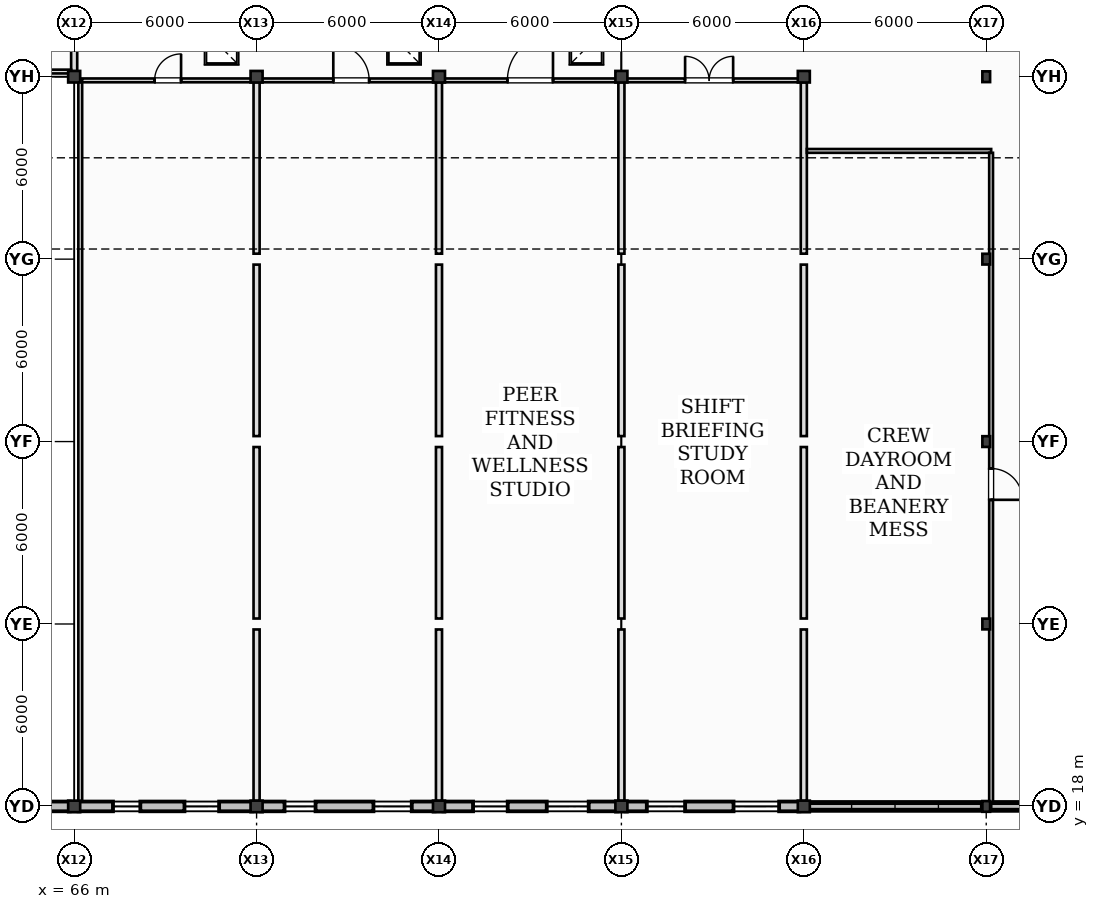
"""IFC4 building model, lengths in metres.
Left out: names, types, materials, properties, quantities, classifications, styles, units other than length and angle.
Written with IfcOpenShell. Run it as: python <this file> out.ifc"""

import sys

from ifc_helpers import new_model, si_unit, direction, frame, frame_2d, origin, origin_2d, place, context, subcontext, project, spatial, rectangle, i_section, extrude, element, fill, save


model = new_model("IFC4")
c1 = context("Model", 3, precision=1e-05, world=origin(), true_north=direction((0.0, 1.0)))
c2 = subcontext(c1, "Body", "Model", "MODEL_VIEW")
j1 = project(units=[si_unit("LENGTHUNIT", "METRE"), si_unit("PLANEANGLEUNIT", "RADIAN")], contexts=[c1])
p1 = place(None, origin())
s1 = spatial("IfcSite", under=j1, at=p1, CompositionType="ELEMENT")
p2 = place(p1, origin())
s2 = spatial("IfcBuilding", under=s1, at=p2, CompositionType="ELEMENT")
p3 = place(p2, frame((0.0, 0.0, 6.0)))
s3 = spatial("IfcBuildingStorey", under=s2, at=p3, CompositionType="ELEMENT", Elevation=6.0)
for number, where, z_axis, x_axis in (
    (1, (66.0, 42.0, 0.0), (0.0, 0.0, 1.0), (1.0, 0.0, 0.0)),
    (2, (66.0, 18.0, 0.0), (0.0, 0.0, 1.0), (1.0, 0.0, 0.0)),
    (3, (72.0, 18.0, 0.0), (0.0, 0.0, 1.0), (1.0, 0.0, 0.0)),
    (4, (72.0, 42.0, 0.0), (0.0, 0.0, 1.0), (1.0, 0.0, 0.0)),
    (5, (78.0, 18.0, 0.0), (0.0, 0.0, 1.0), (1.0, 0.0, 0.0)),
    (6, (78.0, 42.0, 0.0), (0.0, 0.0, 1.0), (1.0, 0.0, 0.0)),
    (7, (84.0, 18.0, 0.0), (0.0, 0.0, 1.0), (1.0, 0.0, 0.0)),
    (8, (84.0, 42.0, 0.0), (0.0, 0.0, 1.0), (1.0, 0.0, 0.0)),
    (9, (90.0, 18.0, 0.0), (0.0, 0.0, 1.0), (1.0, 0.0, 0.0)),
    (10, (90.0, 42.0, 0.0), (0.0, 0.0, 1.0), (1.0, 0.0, 0.0)),
):
    element("IfcColumn", number, at=place(p3, frame(where, z_axis=z_axis, x_axis=x_axis)), inside=s3, PredefinedType="COLUMN", context=c2, shape_type="SweptSolid", body=[
        extrude(i_section(OverallWidth=0.395, OverallDepth=0.38, WebThickness=0.019, FlangeThickness=0.03, at=origin_2d()), origin(), (0.0, 0.0, 1.0), 4.0),
    ])
for number, where, z_axis, x_axis in (
    (11, (96.0, 18.0, 0.0), (0.0, 0.0, 1.0), (1.0, 0.0, 0.0)),
    (12, (96.0, 24.0, 0.0), (0.0, 0.0, 1.0), (1.0, 0.0, 0.0)),
    (13, (96.0, 30.0, 0.0), (0.0, 0.0, 1.0), (1.0, 0.0, 0.0)),
    (14, (96.0, 36.0, 0.0), (0.0, 0.0, 1.0), (1.0, 0.0, 0.0)),
    (15, (96.0, 42.0, 0.0), (0.0, 0.0, 1.0), (1.0, 0.0, 0.0)),
):
    element("IfcColumn", number, at=place(p3, frame(where, z_axis=z_axis, x_axis=x_axis)), inside=s3, PredefinedType="COLUMN", context=c2, shape_type="SweptSolid", body=[
        extrude(i_section(OverallWidth=0.254, OverallDepth=0.353, WebThickness=0.01, FlangeThickness=0.016, at=origin_2d()), origin(), (0.0, 0.0, 1.0), 4.0),
    ])
p4 = place(p3, frame((60.145, 18.0, 0.0), z_axis=(0.0, 0.0, 1.0), x_axis=(1.0, 0.0, 0.0)))
e16 = element("IfcWall", 16, at=p4, inside=s3, PredefinedType="STANDARD", context=c2, shape_type="SweptSolid", body=[
    extrude(rectangle(XDim=5.71, YDim=0.32, at=frame_2d((2.855, 0.0))), origin(), (0.0, 0.0, 1.0), 4.0),
])
p5 = place(p4, frame((0.817, 0.0, 1.42)))
e17 = element("IfcOpeningElement", 17, at=p5, cuts=e16, PredefinedType="OPENING", context=c2, shape_type="SweptSolid", body=[
    extrude(rectangle(XDim=0.9, YDim=0.9, at=frame_2d((0.45, 0.45))), frame((0.0, 0.17, 0.0), z_axis=(0.0, -1.0, 0.0), x_axis=(1.0, 0.0, 0.0)), (0.0, 0.0, 1.0), 0.34),
])
p6 = place(p4, frame((3.777, 0.0, 1.28)))
e18 = element("IfcOpeningElement", 18, at=p6, cuts=e16, PredefinedType="OPENING", context=c2, shape_type="SweptSolid", body=[
    extrude(rectangle(XDim=1.14, YDim=1.14, at=frame_2d((0.57, 0.57))), frame((0.0, 0.17, 0.0), z_axis=(0.0, -1.0, 0.0), x_axis=(1.0, 0.0, 0.0)), (0.0, 0.0, 1.0), 0.34),
])
p7 = place(p3, frame((66.145, 18.0, 0.0), z_axis=(0.0, 0.0, 1.0), x_axis=(1.0, 0.0, 0.0)))
e19 = element("IfcWall", 19, at=p7, inside=s3, PredefinedType="STANDARD", context=c2, shape_type="SweptSolid", body=[
    extrude(rectangle(XDim=5.71, YDim=0.32, at=frame_2d((2.855, 0.0))), origin(), (0.0, 0.0, 1.0), 3.223),
])
p8 = place(p7, frame((1.131, 0.0, 1.18)))
e20 = element("IfcOpeningElement", 20, at=p8, cuts=e19, PredefinedType="OPENING", context=c2, shape_type="SweptSolid", body=[
    extrude(rectangle(XDim=0.9, YDim=0.9, at=frame_2d((0.45, 0.45))), frame((0.0, 0.17, 0.0), z_axis=(0.0, -1.0, 0.0), x_axis=(1.0, 0.0, 0.0)), (0.0, 0.0, 1.0), 0.34),
])
p9 = place(p7, frame((3.483, 0.0, 0.96)))
e21 = element("IfcOpeningElement", 21, at=p9, cuts=e19, PredefinedType="OPENING", context=c2, shape_type="SweptSolid", body=[
    extrude(rectangle(XDim=1.14, YDim=1.14, at=frame_2d((0.57, 0.57))), frame((0.0, 0.17, 0.0), z_axis=(0.0, -1.0, 0.0), x_axis=(1.0, 0.0, 0.0)), (0.0, 0.0, 1.0), 0.34),
])
p10 = place(p3, frame((72.145, 18.0, 0.0), z_axis=(0.0, 0.0, 1.0), x_axis=(1.0, 0.0, 0.0)))
e22 = element("IfcWall", 22, at=p10, inside=s3, PredefinedType="STANDARD", context=c2, shape_type="SweptSolid", body=[
    extrude(rectangle(XDim=5.71, YDim=0.32, at=frame_2d((2.855, 0.0))), origin(), (0.0, 0.0, 1.0), 3.223),
])
p11 = place(p10, frame((0.775, 0.0, 1.42)))
e23 = element("IfcOpeningElement", 23, at=p11, cuts=e22, PredefinedType="OPENING", context=c2, shape_type="SweptSolid", body=[
    extrude(rectangle(XDim=1.02, YDim=1.02, at=frame_2d((0.51, 0.51))), frame((0.0, 0.17, 0.0), z_axis=(0.0, -1.0, 0.0), x_axis=(1.0, 0.0, 0.0)), (0.0, 0.0, 1.0), 0.34),
])
p12 = place(p10, frame((3.699, 0.0, 1.28)))
e24 = element("IfcOpeningElement", 24, at=p12, cuts=e22, PredefinedType="OPENING", context=c2, shape_type="SweptSolid", body=[
    extrude(rectangle(XDim=1.26, YDim=1.26, at=frame_2d((0.63, 0.63))), frame((0.0, 0.17, 0.0), z_axis=(0.0, -1.0, 0.0), x_axis=(1.0, 0.0, 0.0)), (0.0, 0.0, 1.0), 0.34),
])
p13 = place(p3, frame((78.145, 18.0, 0.0), z_axis=(0.0, 0.0, 1.0), x_axis=(1.0, 0.0, 0.0)))
e25 = element("IfcWall", 25, at=p13, inside=s3, PredefinedType="STANDARD", context=c2, shape_type="SweptSolid", body=[
    extrude(rectangle(XDim=5.71, YDim=0.32, at=frame_2d((2.855, 0.0))), origin(), (0.0, 0.0, 1.0), 3.223),
])
p14 = place(p13, frame((0.975, 0.0, 0.96)))
e26 = element("IfcOpeningElement", 26, at=p14, cuts=e25, PredefinedType="OPENING", context=c2, shape_type="SweptSolid", body=[
    extrude(rectangle(XDim=1.14, YDim=1.14, at=frame_2d((0.57, 0.57))), frame((0.0, 0.17, 0.0), z_axis=(0.0, -1.0, 0.0), x_axis=(1.0, 0.0, 0.0)), (0.0, 0.0, 1.0), 0.34),
])
p15 = place(p13, frame((3.399, 0.0, 0.86)))
e27 = element("IfcOpeningElement", 27, at=p15, cuts=e25, PredefinedType="OPENING", context=c2, shape_type="SweptSolid", body=[
    extrude(rectangle(XDim=1.38, YDim=1.38, at=frame_2d((0.69, 0.69))), frame((0.0, 0.17, 0.0), z_axis=(0.0, -1.0, 0.0), x_axis=(1.0, 0.0, 0.0)), (0.0, 0.0, 1.0), 0.34),
])
p16 = place(p3, frame((84.145, 18.0, 0.0), z_axis=(0.0, 0.0, 1.0), x_axis=(1.0, 0.0, 0.0)))
e28 = element("IfcWall", 28, at=p16, inside=s3, PredefinedType="STANDARD", context=c2, shape_type="SweptSolid", body=[
    extrude(rectangle(XDim=5.71, YDim=0.32, at=frame_2d((2.855, 0.0))), origin(), (0.0, 0.0, 1.0), 3.223),
])
p17 = place(p16, frame((0.691, 0.0, 1.28)))
e29 = element("IfcOpeningElement", 29, at=p17, cuts=e28, PredefinedType="OPENING", context=c2, shape_type="SweptSolid", body=[
    extrude(rectangle(XDim=1.26, YDim=1.26, at=frame_2d((0.63, 0.63))), frame((0.0, 0.17, 0.0), z_axis=(0.0, -1.0, 0.0), x_axis=(1.0, 0.0, 0.0)), (0.0, 0.0, 1.0), 0.34),
])
p18 = place(p16, frame((3.543, 0.0, 1.18)))
e30 = element("IfcOpeningElement", 30, at=p18, cuts=e28, PredefinedType="OPENING", context=c2, shape_type="SweptSolid", body=[
    extrude(rectangle(XDim=1.5, YDim=1.5, at=frame_2d((0.75, 0.75))), frame((0.0, 0.17, 0.0), z_axis=(0.0, -1.0, 0.0), x_axis=(1.0, 0.0, 0.0)), (0.0, 0.0, 1.0), 0.34),
])
p19 = place(p3, frame((90.145, 18.0, 0.0), z_axis=(0.0, 0.0, 1.0), x_axis=(1.0, 0.0, 0.0)))
e31 = element("IfcWall", 31, at=p19, inside=s3, PredefinedType="STANDARD", context=c2, shape_type="SweptSolid", body=[
    extrude(rectangle(XDim=5.71, YDim=0.29, at=frame_2d((2.855, 0.0))), origin(), (0.0, 0.0, 1.0), 0.92),
])
p20 = place(p3, frame((96.145, 18.0, 0.0), z_axis=(0.0, 0.0, 1.0), x_axis=(1.0, 0.0, 0.0)))
e32 = element("IfcWall", 32, at=p20, inside=s3, PredefinedType="STANDARD", context=c2, shape_type="SweptSolid", body=[
    extrude(rectangle(XDim=5.71, YDim=0.29, at=frame_2d((2.855, 0.0))), origin(), (0.0, 0.0, 1.0), 0.32),
])
p21 = place(p3, frame((66.0, 42.18, 0.0), z_axis=(0.0, 0.0, 1.0), x_axis=(0.0, 1.0, 0.0)))
e33 = element("IfcWall", 33, at=p21, inside=s3, PredefinedType="PARTITIONING", context=c2, shape_type="SweptSolid", body=[
    extrude(rectangle(XDim=5.72, YDim=0.2, at=frame_2d((2.86, 0.0))), origin(), (0.0, 0.0, 1.0), 3.65),
])
for number, where, z_axis, x_axis in (
    (34, (72.0, 18.18, 0.0), (0.0, 0.0, 1.0), (0.0, 1.0, 0.0)),
    (35, (72.0, 24.18, 0.0), (0.0, 0.0, 1.0), (0.0, 1.0, 0.0)),
    (36, (72.0, 30.18, 0.0), (0.0, 0.0, 1.0), (0.0, 1.0, 0.0)),
    (37, (72.0, 36.18, 0.0), (0.0, 0.0, 1.0), (0.0, 1.0, 0.0)),
    (38, (78.0, 18.18, 0.0), (0.0, 0.0, 1.0), (0.0, 1.0, 0.0)),
    (39, (78.0, 24.18, 0.0), (0.0, 0.0, 1.0), (0.0, 1.0, 0.0)),
    (40, (78.0, 30.18, 0.0), (0.0, 0.0, 1.0), (0.0, 1.0, 0.0)),
    (41, (78.0, 36.18, 0.0), (0.0, 0.0, 1.0), (0.0, 1.0, 0.0)),
    (42, (84.0, 18.18, 0.0), (0.0, 0.0, 1.0), (0.0, 1.0, 0.0)),
    (43, (84.0, 24.18, 0.0), (0.0, 0.0, 1.0), (0.0, 1.0, 0.0)),
    (44, (84.0, 30.18, 0.0), (0.0, 0.0, 1.0), (0.0, 1.0, 0.0)),
    (45, (84.0, 36.18, 0.0), (0.0, 0.0, 1.0), (0.0, 1.0, 0.0)),
    (46, (90.0, 18.18, 0.0), (0.0, 0.0, 1.0), (0.0, 1.0, 0.0)),
    (47, (90.0, 24.18, 0.0), (0.0, 0.0, 1.0), (0.0, 1.0, 0.0)),
    (48, (90.0, 30.18, 0.0), (0.0, 0.0, 1.0), (0.0, 1.0, 0.0)),
    (49, (90.0, 36.18, 0.0), (0.0, 0.0, 1.0), (0.0, 1.0, 0.0)),
):
    element("IfcWall", number, at=place(p3, frame(where, z_axis=z_axis, x_axis=x_axis)), inside=s3, PredefinedType="PARTITIONING", context=c2, shape_type="SweptSolid", body=[
        extrude(rectangle(XDim=5.64, YDim=0.2, at=frame_2d((2.82, 0.0))), origin(), (0.0, 0.0, 1.0), 2.98),
    ])
p22 = place(p3, frame((65.9, 42.17, 0.0), z_axis=(0.0, 0.0, 1.0), x_axis=(-1.0, 0.0, 0.0)))
e50 = element("IfcWall", 50, at=p22, inside=s3, PredefinedType="PARTITIONING", context=c2, shape_type="SweptSolid", body=[
    extrude(rectangle(XDim=11.92, YDim=0.125, at=frame_2d((5.96, 0.0))), origin(), (0.0, 0.0, 1.0), 3.72),
])
p23 = place(p3, frame((66.2, 18.16, 0.0), z_axis=(0.0, 0.0, 1.0), x_axis=(0.0, 1.0, 0.0)))
e51 = element("IfcWall", 51, at=p23, inside=s3, PredefinedType="PARTITIONING", context=c2, shape_type="SweptSolid", body=[
    extrude(rectangle(XDim=23.723, YDim=0.125, at=frame_2d((11.861, 0.0))), origin(), (0.0, 0.0, 1.0), 2.999),
])
p24 = place(p3, frame((66.262, 41.88, 0.0), z_axis=(0.0, 0.0, 1.0), x_axis=(1.0, 0.0, 0.0)))
e52 = element("IfcWall", 52, at=p24, inside=s3, PredefinedType="PARTITIONING", context=c2, shape_type="SweptSolid", body=[
    extrude(rectangle(XDim=5.637, YDim=0.125, at=frame_2d((2.819, 0.0))), origin(), (0.0, 0.0, 1.0), 3.153),
])
p25 = place(p24, frame((2.384, 0.0, 0.0)))
e53 = element("IfcOpeningElement", 53, at=p25, cuts=e52, PredefinedType="OPENING", context=c2, shape_type="SweptSolid", body=[
    extrude(rectangle(XDim=0.87, YDim=2.06, at=frame_2d((0.435, 1.03))), frame((0.0, 0.073, 0.0), z_axis=(0.0, -1.0, 0.0), x_axis=(1.0, 0.0, 0.0)), (0.0, 0.0, 1.0), 0.145),
])
p26 = place(p3, frame((72.1, 41.88, 0.0), z_axis=(0.0, 0.0, 1.0), x_axis=(1.0, 0.0, 0.0)))
e54 = element("IfcWall", 54, at=p26, inside=s3, PredefinedType="PARTITIONING", context=c2, shape_type="SweptSolid", body=[
    extrude(rectangle(XDim=5.8, YDim=0.125, at=frame_2d((2.9, 0.0))), origin(), (0.0, 0.0, 1.0), 3.153),
])
p27 = place(p26, frame((2.423, 0.0, 0.0)))
e55 = element("IfcOpeningElement", 55, at=p27, cuts=e54, PredefinedType="OPENING", context=c2, shape_type="SweptSolid", body=[
    extrude(rectangle(XDim=1.18, YDim=2.16, at=frame_2d((0.59, 1.08))), frame((0.0, 0.073, 0.0), z_axis=(0.0, -1.0, 0.0), x_axis=(1.0, 0.0, 0.0)), (0.0, 0.0, 1.0), 0.145),
])
p28 = place(p3, frame((78.1, 41.88, 0.0), z_axis=(0.0, 0.0, 1.0), x_axis=(1.0, 0.0, 0.0)))
e56 = element("IfcWall", 56, at=p28, inside=s3, PredefinedType="PARTITIONING", context=c2, shape_type="SweptSolid", body=[
    extrude(rectangle(XDim=5.8, YDim=0.125, at=frame_2d((2.9, 0.0))), origin(), (0.0, 0.0, 1.0), 3.153),
])
p29 = place(p28, frame((2.15, 0.0, 0.0)))
e57 = element("IfcOpeningElement", 57, at=p29, cuts=e56, PredefinedType="OPENING", context=c2, shape_type="SweptSolid", body=[
    extrude(rectangle(XDim=1.5, YDim=2.22, at=frame_2d((0.75, 1.11))), frame((0.0, 0.073, 0.0), z_axis=(0.0, -1.0, 0.0), x_axis=(1.0, 0.0, 0.0)), (0.0, 0.0, 1.0), 0.145),
])
p30 = place(p3, frame((84.1, 41.88, 0.0), z_axis=(0.0, 0.0, 1.0), x_axis=(1.0, 0.0, 0.0)))
e58 = element("IfcWall", 58, at=p30, inside=s3, PredefinedType="PARTITIONING", context=c2, shape_type="SweptSolid", body=[
    extrude(rectangle(XDim=5.8, YDim=0.125, at=frame_2d((2.9, 0.0))), origin(), (0.0, 0.0, 1.0), 3.153),
])
p31 = place(p30, frame((1.995, 0.0, 0.0)))
e59 = element("IfcOpeningElement", 59, at=p31, cuts=e58, PredefinedType="OPENING", context=c2, shape_type="SweptSolid", body=[
    extrude(rectangle(XDim=1.58, YDim=2.2, at=frame_2d((0.79, 1.1))), frame((0.0, 0.073, 0.0), z_axis=(0.0, -1.0, 0.0), x_axis=(1.0, 0.0, 0.0)), (0.0, 0.0, 1.0), 0.145),
])
p32 = place(p3, frame((90.1, 39.56, 0.0), z_axis=(0.0, 0.0, 1.0), x_axis=(1.0, 0.0, 0.0)))
e60 = element("IfcWall", 60, at=p32, inside=s3, PredefinedType="PARTITIONING", context=c2, shape_type="SweptSolid", body=[
    extrude(rectangle(XDim=6.062, YDim=0.125, at=frame_2d((3.031, 0.0))), origin(), (0.0, 0.0, 1.0), 3.72),
])
p33 = place(p3, frame((96.16, 39.498, 0.0), z_axis=(0.0, 0.0, 1.0), x_axis=(0.0, -1.0, 0.0)))
e61 = element("IfcWall", 61, at=p33, inside=s3, PredefinedType="PARTITIONING", context=c2, shape_type="SweptSolid", body=[
    extrude(rectangle(XDim=21.353, YDim=0.125, at=frame_2d((10.676, 0.0))), origin(), (0.0, 0.0, 1.0), 3.157),
])
p34 = place(p33, frame((10.384, 0.0, 0.0)))
e62 = element("IfcOpeningElement", 62, at=p34, cuts=e61, PredefinedType="OPENING", context=c2, shape_type="SweptSolid", body=[
    extrude(rectangle(XDim=1.03, YDim=2.15, at=frame_2d((0.515, 1.075))), frame((0.0, 0.073, 0.0), z_axis=(0.0, -1.0, 0.0), x_axis=(1.0, 0.0, 0.0)), (0.0, 0.0, 1.0), 0.145),
])
p35 = place(p8, origin())
e63 = element("IfcWindow", 63, at=p35, inside=s3, PartitioningType="SINGLE_PANEL", PredefinedType="WINDOW", context=c2, shape_type="SweptSolid", body=[
    extrude(rectangle(XDim=0.9, YDim=0.9, at=frame_2d((0.45, 0.45))), frame((0.0, 0.03, 0.0), z_axis=(0.0, -1.0, 0.0), x_axis=(1.0, 0.0, 0.0)), (0.0, 0.0, 1.0), 0.06),
])
fill(e20, e63)
p36 = place(p9, origin())
e64 = element("IfcWindow", 64, at=p36, inside=s3, PartitioningType="SINGLE_PANEL", PredefinedType="WINDOW", context=c2, shape_type="SweptSolid", body=[
    extrude(rectangle(XDim=1.14, YDim=1.14, at=frame_2d((0.57, 0.57))), frame((0.0, 0.03, 0.0), z_axis=(0.0, -1.0, 0.0), x_axis=(1.0, 0.0, 0.0)), (0.0, 0.0, 1.0), 0.06),
])
fill(e21, e64)
p37 = place(p11, origin())
e65 = element("IfcWindow", 65, at=p37, inside=s3, PartitioningType="SINGLE_PANEL", PredefinedType="WINDOW", context=c2, shape_type="SweptSolid", body=[
    extrude(rectangle(XDim=1.02, YDim=1.02, at=frame_2d((0.51, 0.51))), frame((0.0, 0.03, 0.0), z_axis=(0.0, -1.0, 0.0), x_axis=(1.0, 0.0, 0.0)), (0.0, 0.0, 1.0), 0.06),
])
fill(e23, e65)
p38 = place(p12, origin())
e66 = element("IfcWindow", 66, at=p38, inside=s3, PartitioningType="SINGLE_PANEL", PredefinedType="WINDOW", context=c2, shape_type="SweptSolid", body=[
    extrude(rectangle(XDim=1.26, YDim=1.26, at=frame_2d((0.63, 0.63))), frame((0.0, 0.03, 0.0), z_axis=(0.0, -1.0, 0.0), x_axis=(1.0, 0.0, 0.0)), (0.0, 0.0, 1.0), 0.06),
])
fill(e24, e66)
p39 = place(p14, origin())
e67 = element("IfcWindow", 67, at=p39, inside=s3, PartitioningType="SINGLE_PANEL", PredefinedType="WINDOW", context=c2, shape_type="SweptSolid", body=[
    extrude(rectangle(XDim=1.14, YDim=1.14, at=frame_2d((0.57, 0.57))), frame((0.0, 0.03, 0.0), z_axis=(0.0, -1.0, 0.0), x_axis=(1.0, 0.0, 0.0)), (0.0, 0.0, 1.0), 0.06),
])
fill(e26, e67)
p40 = place(p15, origin())
e68 = element("IfcWindow", 68, at=p40, inside=s3, PartitioningType="SINGLE_PANEL", PredefinedType="WINDOW", context=c2, shape_type="SweptSolid", body=[
    extrude(rectangle(XDim=1.38, YDim=1.38, at=frame_2d((0.69, 0.69))), frame((0.0, 0.03, 0.0), z_axis=(0.0, -1.0, 0.0), x_axis=(1.0, 0.0, 0.0)), (0.0, 0.0, 1.0), 0.06),
])
fill(e27, e68)
p41 = place(p17, origin())
e69 = element("IfcWindow", 69, at=p41, inside=s3, PartitioningType="SINGLE_PANEL", PredefinedType="WINDOW", context=c2, shape_type="SweptSolid", body=[
    extrude(rectangle(XDim=1.26, YDim=1.26, at=frame_2d((0.63, 0.63))), frame((0.0, 0.03, 0.0), z_axis=(0.0, -1.0, 0.0), x_axis=(1.0, 0.0, 0.0)), (0.0, 0.0, 1.0), 0.06),
])
fill(e29, e69)
p42 = place(p18, origin())
e70 = element("IfcWindow", 70, at=p42, inside=s3, PartitioningType="SINGLE_PANEL", PredefinedType="WINDOW", context=c2, shape_type="SweptSolid", body=[
    extrude(rectangle(XDim=1.5, YDim=1.5, at=frame_2d((0.75, 0.75))), frame((0.0, 0.03, 0.0), z_axis=(0.0, -1.0, 0.0), x_axis=(1.0, 0.0, 0.0)), (0.0, 0.0, 1.0), 0.06),
])
fill(e30, e70)
p43 = place(p25, frame((0.87, 0.0, 0.0), z_axis=(0.0, 0.0, 1.0), x_axis=(-1.0, 0.0, 0.0)))
e71 = element("IfcDoor", 71, at=p43, inside=s3, OperationType="SINGLE_SWING_RIGHT", PredefinedType="DOOR", context=c2, shape_type="SweptSolid", body=[
    extrude(rectangle(XDim=0.87, YDim=2.06, at=frame_2d((0.435, 1.03))), frame((0.0, 0.025, 0.0), z_axis=(0.0, -1.0, 0.0), x_axis=(1.0, 0.0, 0.0)), (0.0, 0.0, 1.0), 0.05),
])
fill(e53, e71)
p44 = place(p27, frame((1.18, 0.0, 0.0), z_axis=(0.0, 0.0, 1.0), x_axis=(-1.0, 0.0, 0.0)))
e72 = element("IfcDoor", 72, at=p44, inside=s3, OperationType="SINGLE_SWING_LEFT", PredefinedType="DOOR", context=c2, shape_type="SweptSolid", body=[
    extrude(rectangle(XDim=1.18, YDim=2.16, at=frame_2d((0.59, 1.08))), frame((0.0, 0.025, 0.0), z_axis=(0.0, -1.0, 0.0), x_axis=(1.0, 0.0, 0.0)), (0.0, 0.0, 1.0), 0.05),
])
fill(e55, e72)
p45 = place(p29, frame((1.5, 0.0, 0.0), z_axis=(0.0, 0.0, 1.0), x_axis=(-1.0, 0.0, 0.0)))
e73 = element("IfcDoor", 73, at=p45, inside=s3, OperationType="SINGLE_SWING_RIGHT", PredefinedType="DOOR", context=c2, shape_type="SweptSolid", body=[
    extrude(rectangle(XDim=1.5, YDim=2.22, at=frame_2d((0.75, 1.11))), frame((0.0, 0.025, 0.0), z_axis=(0.0, -1.0, 0.0), x_axis=(1.0, 0.0, 0.0)), (0.0, 0.0, 1.0), 0.05),
])
fill(e57, e73)
p46 = place(p31, frame((1.58, 0.0, 0.0), z_axis=(0.0, 0.0, 1.0), x_axis=(-1.0, 0.0, 0.0)))
e74 = element("IfcDoor", 74, at=p46, inside=s3, OperationType="DOUBLE_DOOR_SINGLE_SWING", PredefinedType="DOOR", context=c2, shape_type="SweptSolid", body=[
    extrude(rectangle(XDim=1.58, YDim=2.2, at=frame_2d((0.79, 1.1))), frame((0.0, 0.025, 0.0), z_axis=(0.0, -1.0, 0.0), x_axis=(1.0, 0.0, 0.0)), (0.0, 0.0, 1.0), 0.05),
])
fill(e59, e74)
p47 = place(p34, origin())
e75 = element("IfcDoor", 75, at=p47, inside=s3, OperationType="SINGLE_SWING_RIGHT", PredefinedType="DOOR", context=c2, shape_type="SweptSolid", body=[
    extrude(rectangle(XDim=1.03, YDim=2.15, at=frame_2d((0.515, 1.075))), frame((0.0, 0.025, 0.0), z_axis=(0.0, -1.0, 0.0), x_axis=(1.0, 0.0, 0.0)), (0.0, 0.0, 1.0), 0.05),
])
fill(e62, e75)
save(model, sys.argv[1])
